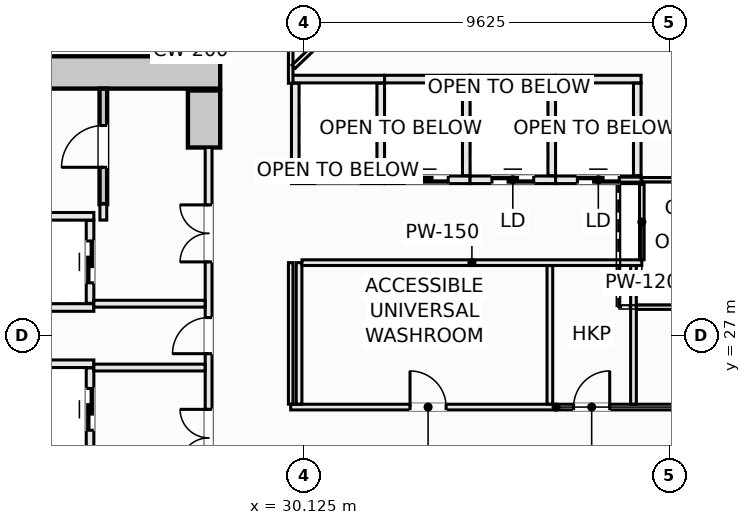
"""IFC4 building model, lengths in metres.
Left out: names, types, materials, properties, quantities, classifications, styles, units other than length and angle.
Written with IfcOpenShell. Run it as: python <this file> out.ifc"""

import sys

from ifc_helpers import new_model, si_unit, direction, frame, frame_2d, origin, place, context, subcontext, project, spatial, rectangle, extrude, element, fill, save


model = new_model("IFC4")
c1 = context("Model", 3, precision=1e-05, world=origin(), true_north=direction((0.0, 1.0)))
c2 = subcontext(c1, "Body", "Model", "MODEL_VIEW")
j1 = project(units=[si_unit("LENGTHUNIT", "METRE"), si_unit("PLANEANGLEUNIT", "RADIAN")], contexts=[c1])
p1 = place(None, origin())
s1 = spatial("IfcSite", under=j1, at=p1, CompositionType="ELEMENT")
p2 = place(p1, origin())
s2 = spatial("IfcBuilding", under=s1, at=p2, CompositionType="ELEMENT")
p3 = place(p2, frame((0.0, 0.0, 26.5)))
s3 = spatial("IfcBuildingStorey", under=s2, at=p3, CompositionType="ELEMENT", Elevation=26.5)
p4 = place(p3, frame((14.075, 33.925, -0.28), z_axis=(0.0, 0.0, 1.0), x_axis=(1.0, 0.0, 0.0)))
e1 = element("IfcWall", 1, at=p4, inside=s3, PredefinedType="SHEAR", context=c2, shape_type="SweptSolid", body=[
    extrude(rectangle(XDim=13.85, YDim=0.85, at=frame_2d((6.925, 0.0))), origin(), (0.0, 0.0, 1.0), 3.85),
])
p5 = place(p3, frame((27.5, 31.95, -0.28), z_axis=(0.0, 0.0, 1.0), x_axis=(0.0, 1.0, 0.0)))
e2 = element("IfcWall", 2, at=p5, inside=s3, PredefinedType="SHEAR", context=c2, shape_type="SweptSolid", body=[
    extrude(rectangle(XDim=1.5, YDim=0.85, at=frame_2d((0.75, 0.0))), origin(), (0.0, 0.0, 1.0), 3.85),
])
p6 = place(p3, frame((24.85, 30.46, -0.28), z_axis=(0.0, 0.0, 1.0), x_axis=(0.0, 1.0, 0.0)))
e3 = element("IfcWall", 3, at=p6, inside=s3, PredefinedType="SHEAR", context=c2, shape_type="SweptSolid", body=[
    extrude(rectangle(XDim=3.038, YDim=0.2, at=frame_2d((1.519, 0.0))), origin(), (0.0, 0.0, 1.0), 3.85),
])
p7 = place(p6, frame((0.969, 0.0, 0.28)))
e4 = element("IfcOpeningElement", 4, at=p7, cuts=e3, PredefinedType="OPENING", context=c2, shape_type="SweptSolid", body=[
    extrude(rectangle(XDim=1.1, YDim=2.15, at=frame_2d((0.55, 1.075))), frame((0.0, 0.11, 0.0), z_axis=(0.0, -1.0, 0.0), x_axis=(1.0, 0.0, 0.0)), (0.0, 0.0, 1.0), 0.22),
])
for number, where, z_axis, x_axis in (
    (5, (22.15, 30.14, 0.0), (0.0, 0.0, 1.0), (1.0, 0.0, 0.0)),
    (6, (22.15, 27.74, 0.0), (0.0, 0.0, 1.0), (1.0, 0.0, 0.0)),
):
    element("IfcWall", number, at=place(p3, frame(where, z_axis=z_axis, x_axis=x_axis)), inside=s3, PredefinedType="SOLIDWALL", context=c2, shape_type="SweptSolid", body=[
        extrude(rectangle(XDim=2.45, YDim=0.2, at=frame_2d((1.225, 0.0))), origin(), (0.0, 0.0, 1.0), 3.57),
    ])
p8 = place(p3, frame((24.5, 27.85, 0.0), z_axis=(0.0, 0.0, 1.0), x_axis=(0.0, 1.0, 0.0)))
e7 = element("IfcWall", 7, at=p8, inside=s3, PredefinedType="SOLIDWALL", context=c2, shape_type="SweptSolid", body=[
    extrude(rectangle(XDim=2.18, YDim=0.2, at=frame_2d((1.09, 0.0))), origin(), (0.0, 0.0, 1.0), 3.57),
])
p9 = place(p8, frame((0.54, 0.0, 0.0)))
e8 = element("IfcOpeningElement", 8, at=p9, cuts=e7, PredefinedType="OPENING", context=c2, shape_type="SweptSolid", body=[
    extrude(rectangle(XDim=1.1, YDim=2.2, at=frame_2d((0.55, 1.1))), frame((0.0, 0.11, 0.0), z_axis=(0.0, -1.0, 0.0), x_axis=(1.0, 0.0, 0.0)), (0.0, 0.0, 1.0), 0.22),
])
p10 = place(p3, frame((22.15, 26.26, 0.0), z_axis=(0.0, 0.0, 1.0), x_axis=(1.0, 0.0, 0.0)))
e9 = element("IfcWall", 9, at=p10, inside=s3, PredefinedType="SOLIDWALL", context=c2, shape_type="SweptSolid", body=[
    extrude(rectangle(XDim=2.45, YDim=0.2, at=frame_2d((1.225, 0.0))), origin(), (0.0, 0.0, 1.0), 3.57),
])
p11 = place(p3, frame((24.5, 23.97, 0.0), z_axis=(0.0, 0.0, 1.0), x_axis=(0.0, 1.0, 0.0)))
e10 = element("IfcWall", 10, at=p11, inside=s3, PredefinedType="SOLIDWALL", context=c2, shape_type="SweptSolid", body=[
    extrude(rectangle(XDim=2.18, YDim=0.2, at=frame_2d((1.09, 0.0))), origin(), (0.0, 0.0, 1.0), 3.57),
])
p12 = place(p11, frame((0.54, 0.0, 0.0)))
e11 = element("IfcOpeningElement", 11, at=p12, cuts=e10, PredefinedType="OPENING", context=c2, shape_type="SweptSolid", body=[
    extrude(rectangle(XDim=1.1, YDim=2.2, at=frame_2d((0.55, 1.1))), frame((0.0, 0.11, 0.0), z_axis=(0.0, -1.0, 0.0), x_axis=(1.0, 0.0, 0.0)), (0.0, 0.0, 1.0), 0.22),
])
p13 = place(p3, frame((29.8, 33.75, 0.0), z_axis=(0.0, 0.0, 1.0), x_axis=(1.0, 0.0, 0.0)))
e12 = element("IfcWall", 12, at=p13, inside=s3, PredefinedType="SOLIDWALL", context=c2, shape_type="SweptSolid", body=[
    extrude(rectangle(XDim=2.45, YDim=0.2, at=frame_2d((1.225, 0.0))), origin(), (0.0, 0.0, 1.0), 3.57),
])
p14 = place(p3, frame((29.8, 31.1, 0.0), z_axis=(0.0, 0.0, 1.0), x_axis=(1.0, 0.0, 0.0)))
e13 = element("IfcWall", 13, at=p14, inside=s3, PredefinedType="SOLIDWALL", context=c2, shape_type="SweptSolid", body=[
    extrude(rectangle(XDim=2.45, YDim=0.2, at=frame_2d((1.225, 0.0))), origin(), (0.0, 0.0, 1.0), 3.57),
])
p15 = place(p14, frame((0.675, 0.0, 0.0)))
e14 = element("IfcOpeningElement", 14, at=p15, cuts=e13, PredefinedType="OPENING", context=c2, shape_type="SweptSolid", body=[
    extrude(rectangle(XDim=1.1, YDim=2.2, at=frame_2d((0.55, 1.1))), frame((0.0, 0.11, 0.0), z_axis=(0.0, -1.0, 0.0), x_axis=(1.0, 0.0, 0.0)), (0.0, 0.0, 1.0), 0.22),
])
for number, where, z_axis, x_axis in (
    (15, (29.9, 31.21, 0.0), (0.0, 0.0, 1.0), (0.0, 1.0, 0.0)),
    (16, (32.15, 31.21, 0.0), (0.0, 0.0, 1.0), (0.0, 1.0, 0.0)),
):
    element("IfcWall", number, at=place(p3, frame(where, z_axis=z_axis, x_axis=x_axis)), inside=s3, PredefinedType="SOLIDWALL", context=c2, shape_type="SweptSolid", body=[
        extrude(rectangle(XDim=2.43, YDim=0.2, at=frame_2d((1.215, 0.0))), origin(), (0.0, 0.0, 1.0), 3.57),
    ])
p16 = place(p3, frame((32.25, 33.75, 0.0), z_axis=(0.0, 0.0, 1.0), x_axis=(1.0, 0.0, 0.0)))
e17 = element("IfcWall", 17, at=p16, inside=s3, PredefinedType="SOLIDWALL", context=c2, shape_type="SweptSolid", body=[
    extrude(rectangle(XDim=2.25, YDim=0.2, at=frame_2d((1.125, 0.0))), origin(), (0.0, 0.0, 1.0), 3.57),
])
p17 = place(p3, frame((32.25, 31.1, 0.0), z_axis=(0.0, 0.0, 1.0), x_axis=(1.0, 0.0, 0.0)))
e18 = element("IfcWall", 18, at=p17, inside=s3, PredefinedType="SOLIDWALL", context=c2, shape_type="SweptSolid", body=[
    extrude(rectangle(XDim=2.25, YDim=0.2, at=frame_2d((1.125, 0.0))), origin(), (0.0, 0.0, 1.0), 3.57),
])
p18 = place(p17, frame((0.575, 0.0, 0.0)))
e19 = element("IfcOpeningElement", 19, at=p18, cuts=e18, PredefinedType="OPENING", context=c2, shape_type="SweptSolid", body=[
    extrude(rectangle(XDim=1.1, YDim=2.2, at=frame_2d((0.55, 1.1))), frame((0.0, 0.11, 0.0), z_axis=(0.0, -1.0, 0.0), x_axis=(1.0, 0.0, 0.0)), (0.0, 0.0, 1.0), 0.22),
])
p19 = place(p3, frame((34.4, 31.21, 0.0), z_axis=(0.0, 0.0, 1.0), x_axis=(0.0, 1.0, 0.0)))
e20 = element("IfcWall", 20, at=p19, inside=s3, PredefinedType="SOLIDWALL", context=c2, shape_type="SweptSolid", body=[
    extrude(rectangle(XDim=2.43, YDim=0.2, at=frame_2d((1.215, 0.0))), origin(), (0.0, 0.0, 1.0), 3.57),
])
p20 = place(p3, frame((34.5, 33.75, 0.0), z_axis=(0.0, 0.0, 1.0), x_axis=(1.0, 0.0, 0.0)))
e21 = element("IfcWall", 21, at=p20, inside=s3, PredefinedType="SOLIDWALL", context=c2, shape_type="SweptSolid", body=[
    extrude(rectangle(XDim=2.25, YDim=0.2, at=frame_2d((1.125, 0.0))), origin(), (0.0, 0.0, 1.0), 3.57),
])
p21 = place(p3, frame((34.5, 31.1, 0.0), z_axis=(0.0, 0.0, 1.0), x_axis=(1.0, 0.0, 0.0)))
e22 = element("IfcWall", 22, at=p21, inside=s3, PredefinedType="SOLIDWALL", context=c2, shape_type="SweptSolid", body=[
    extrude(rectangle(XDim=2.25, YDim=0.2, at=frame_2d((1.125, 0.0))), origin(), (0.0, 0.0, 1.0), 3.57),
])
p22 = place(p21, frame((0.575, 0.0, 0.0)))
e23 = element("IfcOpeningElement", 23, at=p22, cuts=e22, PredefinedType="OPENING", context=c2, shape_type="SweptSolid", body=[
    extrude(rectangle(XDim=1.1, YDim=2.2, at=frame_2d((0.55, 1.1))), frame((0.0, 0.11, 0.0), z_axis=(0.0, -1.0, 0.0), x_axis=(1.0, 0.0, 0.0)), (0.0, 0.0, 1.0), 0.22),
])
p23 = place(p3, frame((36.65, 31.21, 0.0), z_axis=(0.0, 0.0, 1.0), x_axis=(0.0, 1.0, 0.0)))
e24 = element("IfcWall", 24, at=p23, inside=s3, PredefinedType="SOLIDWALL", context=c2, shape_type="SweptSolid", body=[
    extrude(rectangle(XDim=2.43, YDim=0.2, at=frame_2d((1.215, 0.0))), origin(), (0.0, 0.0, 1.0), 3.57),
])
p24 = place(p3, frame((36.75, 33.75, 0.0), z_axis=(0.0, 0.0, 1.0), x_axis=(1.0, 0.0, 0.0)))
e25 = element("IfcWall", 25, at=p24, inside=s3, PredefinedType="SOLIDWALL", context=c2, shape_type="SweptSolid", body=[
    extrude(rectangle(XDim=2.25, YDim=0.2, at=frame_2d((1.125, 0.0))), origin(), (0.0, 0.0, 1.0), 3.57),
])
p25 = place(p3, frame((36.75, 31.1, 0.0), z_axis=(0.0, 0.0, 1.0), x_axis=(1.0, 0.0, 0.0)))
e26 = element("IfcWall", 26, at=p25, inside=s3, PredefinedType="SOLIDWALL", context=c2, shape_type="SweptSolid", body=[
    extrude(rectangle(XDim=2.25, YDim=0.2, at=frame_2d((1.125, 0.0))), origin(), (0.0, 0.0, 1.0), 3.57),
])
p26 = place(p25, frame((0.575, 0.0, 0.0)))
e27 = element("IfcOpeningElement", 27, at=p26, cuts=e26, PredefinedType="OPENING", context=c2, shape_type="SweptSolid", body=[
    extrude(rectangle(XDim=1.1, YDim=2.2, at=frame_2d((0.55, 1.1))), frame((0.0, 0.11, 0.0), z_axis=(0.0, -1.0, 0.0), x_axis=(1.0, 0.0, 0.0)), (0.0, 0.0, 1.0), 0.22),
])
p27 = place(p3, frame((38.9, 31.21, 0.0), z_axis=(0.0, 0.0, 1.0), x_axis=(0.0, 1.0, 0.0)))
e28 = element("IfcWall", 28, at=p27, inside=s3, PredefinedType="SOLIDWALL", context=c2, shape_type="SweptSolid", body=[
    extrude(rectangle(XDim=2.43, YDim=0.2, at=frame_2d((1.215, 0.0))), origin(), (0.0, 0.0, 1.0), 3.57),
])
p28 = place(p3, frame((24.85, 30.04, 0.0), z_axis=(0.0, 0.0, 1.0), x_axis=(0.0, 1.0, 0.0)))
e29 = element("IfcWall", 29, at=p28, inside=s3, PredefinedType="SOLIDWALL", context=c2, shape_type="SweptSolid", body=[
    extrude(rectangle(XDim=0.42, YDim=0.18, at=frame_2d((0.21, 0.0))), origin(), (0.0, 0.0, 1.0), 3.57),
])
p29 = place(p3, frame((27.62, 22.05, 0.0), z_axis=(0.0, 0.0, 1.0), x_axis=(0.0, 1.0, 0.0)))
e30 = element("IfcWall", 30, at=p29, inside=s3, PredefinedType="SOLIDWALL", context=c2, shape_type="SweptSolid", body=[
    extrude(rectangle(XDim=9.9, YDim=0.18, at=frame_2d((4.95, 0.0))), origin(), (0.0, 0.0, 1.0), 2.662),
])
p30 = place(p29, frame((4.475, 0.0, 0.0)))
e31 = element("IfcOpeningElement", 31, at=p30, cuts=e30, PredefinedType="OPENING", context=c2, shape_type="SweptSolid", body=[
    extrude(rectangle(XDim=0.95, YDim=2.1, at=frame_2d((0.475, 1.05))), frame((0.0, 0.1, 0.0), z_axis=(0.0, -1.0, 0.0), x_axis=(1.0, 0.0, 0.0)), (0.0, 0.0, 1.0), 0.2),
])
p31 = place(p29, frame((6.89, 0.0, 0.0)))
e32 = element("IfcOpeningElement", 32, at=p31, cuts=e30, PredefinedType="OPENING", context=c2, shape_type="SweptSolid", body=[
    extrude(rectangle(XDim=1.5, YDim=2.2, at=frame_2d((0.75, 1.1))), frame((0.0, 0.1, 0.0), z_axis=(0.0, -1.0, 0.0), x_axis=(1.0, 0.0, 0.0)), (0.0, 0.0, 1.0), 0.2),
])
p32 = place(p29, frame((1.51, 0.0, 0.0)))
e33 = element("IfcOpeningElement", 33, at=p32, cuts=e30, PredefinedType="OPENING", context=c2, shape_type="SweptSolid", body=[
    extrude(rectangle(XDim=1.5, YDim=2.2, at=frame_2d((0.75, 1.1))), frame((0.0, 0.1, 0.0), z_axis=(0.0, -1.0, 0.0), x_axis=(1.0, 0.0, 0.0)), (0.0, 0.0, 1.0), 0.2),
])
for number, where, z_axis, x_axis in (
    (34, (24.6, 27.84, 0.0), (0.0, 0.0, 1.0), (1.0, 0.0, 0.0)),
    (35, (24.6, 26.16, 0.0), (0.0, 0.0, 1.0), (1.0, 0.0, 0.0)),
):
    element("IfcWall", number, at=place(p3, frame(where, z_axis=z_axis, x_axis=x_axis)), inside=s3, PredefinedType="SOLIDWALL", context=c2, shape_type="SweptSolid", body=[
        extrude(rectangle(XDim=2.928, YDim=0.18, at=frame_2d((1.464, 0.0))), origin(), (0.0, 0.0, 1.0), 3.57),
    ])
p33 = place(p3, frame((29.78, 25.12, 0.0), z_axis=(0.0, 0.0, 1.0), x_axis=(1.0, 0.0, 0.0)))
e36 = element("IfcWall", 36, at=p33, inside=s3, PredefinedType="PARTITIONING", context=c2, shape_type="SweptSolid", body=[
    extrude(rectangle(XDim=13.97, YDim=0.15, at=frame_2d((6.985, 0.0))), origin(), (0.0, 0.0, 1.0), 3.57),
])
p34 = place(p33, frame((3.14, 0.0, 0.0)))
e37 = element("IfcOpeningElement", 37, at=p34, cuts=e36, PredefinedType="OPENING", context=c2, shape_type="SweptSolid", body=[
    extrude(rectangle(XDim=0.95, YDim=2.1, at=frame_2d((0.475, 1.05))), frame((0.0, 0.085, 0.0), z_axis=(0.0, -1.0, 0.0), x_axis=(1.0, 0.0, 0.0)), (0.0, 0.0, 1.0), 0.17),
])
p35 = place(p33, frame((7.445, 0.0, 0.0)))
e38 = element("IfcOpeningElement", 38, at=p35, cuts=e36, PredefinedType="OPENING", context=c2, shape_type="SweptSolid", body=[
    extrude(rectangle(XDim=0.95, YDim=2.1, at=frame_2d((0.475, 1.05))), frame((0.0, 0.085, 0.0), z_axis=(0.0, -1.0, 0.0), x_axis=(1.0, 0.0, 0.0)), (0.0, 0.0, 1.0), 0.17),
])
p36 = place(p33, frame((10.389, 0.0, 0.0)))
e39 = element("IfcOpeningElement", 39, at=p36, cuts=e36, PredefinedType="OPENING", context=c2, shape_type="SweptSolid", body=[
    extrude(rectangle(XDim=0.95, YDim=2.1, at=frame_2d((0.475, 1.05))), frame((0.0, 0.085, 0.0), z_axis=(0.0, -1.0, 0.0), x_axis=(1.0, 0.0, 0.0)), (0.0, 0.0, 1.0), 0.17),
])
p37 = place(p3, frame((30.0, 25.197, 0.0), z_axis=(0.0, 0.0, 1.0), x_axis=(0.0, 1.0, 0.0)))
e40 = element("IfcWall", 40, at=p37, inside=s3, PredefinedType="PARTITIONING", context=c2, shape_type="SweptSolid", body=[
    extrude(rectangle(XDim=3.723, YDim=0.15, at=frame_2d((1.861, 0.0))), origin(), (0.0, 0.0, 1.0), 3.57),
])
p38 = place(p3, frame((30.077, 28.92, 0.0), z_axis=(0.0, 0.0, 1.0), x_axis=(1.0, 0.0, 0.0)))
e41 = element("IfcWall", 41, at=p38, inside=s3, PredefinedType="PARTITIONING", context=c2, shape_type="SweptSolid", body=[
    extrude(rectangle(XDim=8.943, YDim=0.15, at=frame_2d((4.472, 0.0))), origin(), (0.0, 0.0, 1.0), 3.57),
])
for number, where, z_axis, x_axis in (
    (42, (36.6, 25.197, 0.0), (0.0, 0.0, 1.0), (0.0, 1.0, 0.0)),
    (43, (38.8, 25.197, 0.0), (0.0, 0.0, 1.0), (0.0, 1.0, 0.0)),
):
    element("IfcWall", number, at=place(p3, frame(where, z_axis=z_axis, x_axis=x_axis)), inside=s3, PredefinedType="PARTITIONING", context=c2, shape_type="SweptSolid", body=[
        extrude(rectangle(XDim=3.646, YDim=0.15, at=frame_2d((1.823, 0.0))), origin(), (0.0, 0.0, 1.0), 3.57),
    ])
p39 = place(p3, frame((27.25, 34.352, 0.0), z_axis=(0.0, 0.0, 1.0), x_axis=(0.0, 1.0, 0.0)))
e44 = element("IfcWall", 44, at=p39, inside=s3, PredefinedType="PARTITIONING", context=c2, shape_type="SweptSolid", body=[
    extrude(rectangle(XDim=0.606, YDim=0.12, at=frame_2d((0.303, 0.0))), origin(), (0.0, 0.0, 1.0), 3.57),
])
p40 = place(p3, frame((29.78, 25.197, 0.0), z_axis=(0.0, 0.0, 1.0), x_axis=(0.0, 1.0, 0.0)))
e45 = element("IfcWall", 45, at=p40, inside=s3, PredefinedType="PARTITIONING", context=c2, shape_type="SweptSolid", body=[
    extrude(rectangle(XDim=3.723, YDim=0.12, at=frame_2d((1.861, 0.0))), origin(), (0.0, 0.0, 1.0), 3.57),
])
p41 = place(p3, frame((29.78, 33.64, 0.0), z_axis=(0.0, 0.0, 1.0), x_axis=(0.0, 1.0, 0.0)))
e46 = element("IfcWall", 46, at=p41, inside=s3, PredefinedType="PARTITIONING", context=c2, shape_type="SweptSolid", body=[
    extrude(rectangle(XDim=4.798, YDim=0.12, at=frame_2d((2.399, 0.0))), origin(), (0.0, 0.0, 1.0), 3.57),
])
p42 = place(p41, frame((1.924, 0.0, 0.0)))
e47 = element("IfcOpeningElement", 47, at=p42, cuts=e46, PredefinedType="OPENING", context=c2, shape_type="SweptSolid", body=[
    extrude(rectangle(XDim=0.95, YDim=2.1, at=frame_2d((0.475, 1.05))), frame((0.0, 0.07, 0.0), z_axis=(0.0, -1.0, 0.0), x_axis=(1.0, 0.0, 0.0)), (0.0, 0.0, 1.0), 0.14),
])
p43 = place(p3, frame((39.02, 28.997, 0.0), z_axis=(0.0, 0.0, 1.0), x_axis=(0.0, 1.0, 0.0)))
e48 = element("IfcWall", 48, at=p43, inside=s3, PredefinedType="PARTITIONING", context=c2, shape_type="SweptSolid", body=[
    extrude(rectangle(XDim=1.983, YDim=0.12, at=frame_2d((0.991, 0.0))), origin(), (0.0, 0.0, 1.0), 3.57),
])
p44 = place(p3, frame((38.877, 27.75, 0.0), z_axis=(0.0, 0.0, 1.0), x_axis=(1.0, 0.0, 0.0)))
e49 = element("IfcWall", 49, at=p44, inside=s3, PredefinedType="PARTITIONING", context=c2, shape_type="SweptSolid", body=[
    extrude(rectangle(XDim=5.723, YDim=0.12, at=frame_2d((2.862, 0.0))), origin(), (0.0, 0.0, 1.0), 3.57),
])
p45 = place(p3, frame((39.02, 31.1, 0.0), z_axis=(0.0, 0.0, 1.0), x_axis=(1.0, 0.0, 0.0)))
e50 = element("IfcWall", 50, at=p45, inside=s3, PredefinedType="PARTITIONING", context=c2, shape_type="SweptSolid", body=[
    extrude(rectangle(XDim=5.518, YDim=0.12, at=frame_2d((2.759, 0.0))), origin(), (0.0, 0.0, 1.0), 3.57),
])
p46 = place(p3, frame((29.857, 34.076, 0.0), z_axis=(0.0, 0.0, 1.0), x_axis=(0.723206588645, 0.690631761607, 0.0)))
e51 = element("IfcWall", 51, at=p46, inside=s3, PredefinedType="PARTITIONING", context=c2, shape_type="SweptSolid", body=[
    extrude(rectangle(XDim=18.272, YDim=0.12, at=frame_2d((9.136, 0.0))), origin(), (0.0, 0.0, 1.0), 2.934),
])
p47 = place(p7, origin())
e52 = element("IfcDoor", 52, at=p47, inside=s3, OperationType="SINGLE_SWING_LEFT", PredefinedType="DOOR", context=c2, shape_type="SweptSolid", body=[
    extrude(rectangle(XDim=1.1, YDim=2.15, at=frame_2d((0.55, 1.075))), frame((0.0, 0.025, 0.0), z_axis=(0.0, -1.0, 0.0), x_axis=(1.0, 0.0, 0.0)), (0.0, 0.0, 1.0), 0.05),
])
fill(e4, e52)
p48 = place(p9, origin())
e53 = element("IfcDoor", 53, at=p48, inside=s3, OperationType="SLIDING_TO_LEFT", PredefinedType="DOOR", context=c2, shape_type="SweptSolid", body=[
    extrude(rectangle(XDim=1.1, YDim=2.2, at=frame_2d((0.55, 1.1))), frame((0.0, 0.025, 0.0), z_axis=(0.0, -1.0, 0.0), x_axis=(1.0, 0.0, 0.0)), (0.0, 0.0, 1.0), 0.05),
])
fill(e8, e53)
p49 = place(p12, origin())
e54 = element("IfcDoor", 54, at=p49, inside=s3, OperationType="SLIDING_TO_LEFT", PredefinedType="DOOR", context=c2, shape_type="SweptSolid", body=[
    extrude(rectangle(XDim=1.1, YDim=2.2, at=frame_2d((0.55, 1.1))), frame((0.0, 0.025, 0.0), z_axis=(0.0, -1.0, 0.0), x_axis=(1.0, 0.0, 0.0)), (0.0, 0.0, 1.0), 0.05),
])
fill(e11, e54)
p50 = place(p15, origin())
e55 = element("IfcDoor", 55, at=p50, inside=s3, OperationType="SLIDING_TO_LEFT", PredefinedType="DOOR", context=c2, shape_type="SweptSolid", body=[
    extrude(rectangle(XDim=1.1, YDim=2.2, at=frame_2d((0.55, 1.1))), frame((0.0, 0.025, 0.0), z_axis=(0.0, -1.0, 0.0), x_axis=(1.0, 0.0, 0.0)), (0.0, 0.0, 1.0), 0.05),
])
fill(e14, e55)
p51 = place(p18, origin())
e56 = element("IfcDoor", 56, at=p51, inside=s3, OperationType="SLIDING_TO_LEFT", PredefinedType="DOOR", context=c2, shape_type="SweptSolid", body=[
    extrude(rectangle(XDim=1.1, YDim=2.2, at=frame_2d((0.55, 1.1))), frame((0.0, 0.025, 0.0), z_axis=(0.0, -1.0, 0.0), x_axis=(1.0, 0.0, 0.0)), (0.0, 0.0, 1.0), 0.05),
])
fill(e19, e56)
p52 = place(p22, origin())
e57 = element("IfcDoor", 57, at=p52, inside=s3, OperationType="SLIDING_TO_LEFT", PredefinedType="DOOR", context=c2, shape_type="SweptSolid", body=[
    extrude(rectangle(XDim=1.1, YDim=2.2, at=frame_2d((0.55, 1.1))), frame((0.0, 0.025, 0.0), z_axis=(0.0, -1.0, 0.0), x_axis=(1.0, 0.0, 0.0)), (0.0, 0.0, 1.0), 0.05),
])
fill(e23, e57)
p53 = place(p26, origin())
e58 = element("IfcDoor", 58, at=p53, inside=s3, OperationType="SLIDING_TO_LEFT", PredefinedType="DOOR", context=c2, shape_type="SweptSolid", body=[
    extrude(rectangle(XDim=1.1, YDim=2.2, at=frame_2d((0.55, 1.1))), frame((0.0, 0.025, 0.0), z_axis=(0.0, -1.0, 0.0), x_axis=(1.0, 0.0, 0.0)), (0.0, 0.0, 1.0), 0.05),
])
fill(e27, e58)
p54 = place(p30, origin())
e59 = element("IfcDoor", 59, at=p54, inside=s3, OperationType="SINGLE_SWING_LEFT", PredefinedType="DOOR", context=c2, shape_type="SweptSolid", body=[
    extrude(rectangle(XDim=0.95, YDim=2.1, at=frame_2d((0.475, 1.05))), frame((0.0, 0.025, 0.0), z_axis=(0.0, -1.0, 0.0), x_axis=(1.0, 0.0, 0.0)), (0.0, 0.0, 1.0), 0.05),
])
fill(e31, e59)
p55 = place(p31, origin())
e60 = element("IfcDoor", 60, at=p55, inside=s3, OperationType="DOUBLE_DOOR_SINGLE_SWING", PredefinedType="DOOR", context=c2, shape_type="SweptSolid", body=[
    extrude(rectangle(XDim=1.5, YDim=2.2, at=frame_2d((0.75, 1.1))), frame((0.0, 0.025, 0.0), z_axis=(0.0, -1.0, 0.0), x_axis=(1.0, 0.0, 0.0)), (0.0, 0.0, 1.0), 0.05),
])
fill(e32, e60)
p56 = place(p32, origin())
e61 = element("IfcDoor", 61, at=p56, inside=s3, OperationType="DOUBLE_DOOR_SINGLE_SWING", PredefinedType="DOOR", context=c2, shape_type="SweptSolid", body=[
    extrude(rectangle(XDim=1.5, YDim=2.2, at=frame_2d((0.75, 1.1))), frame((0.0, 0.025, 0.0), z_axis=(0.0, -1.0, 0.0), x_axis=(1.0, 0.0, 0.0)), (0.0, 0.0, 1.0), 0.05),
])
fill(e33, e61)
p57 = place(p34, origin())
e62 = element("IfcDoor", 62, at=p57, inside=s3, OperationType="SINGLE_SWING_LEFT", PredefinedType="DOOR", context=c2, shape_type="SweptSolid", body=[
    extrude(rectangle(XDim=0.95, YDim=2.1, at=frame_2d((0.475, 1.05))), frame((0.0, 0.025, 0.0), z_axis=(0.0, -1.0, 0.0), x_axis=(1.0, 0.0, 0.0)), (0.0, 0.0, 1.0), 0.05),
])
fill(e37, e62)
p58 = place(p35, origin())
e63 = element("IfcDoor", 63, at=p58, inside=s3, OperationType="SINGLE_SWING_RIGHT", PredefinedType="DOOR", context=c2, shape_type="SweptSolid", body=[
    extrude(rectangle(XDim=0.95, YDim=2.1, at=frame_2d((0.475, 1.05))), frame((0.0, 0.025, 0.0), z_axis=(0.0, -1.0, 0.0), x_axis=(1.0, 0.0, 0.0)), (0.0, 0.0, 1.0), 0.05),
])
fill(e38, e63)
save(model, sys.argv[1])
